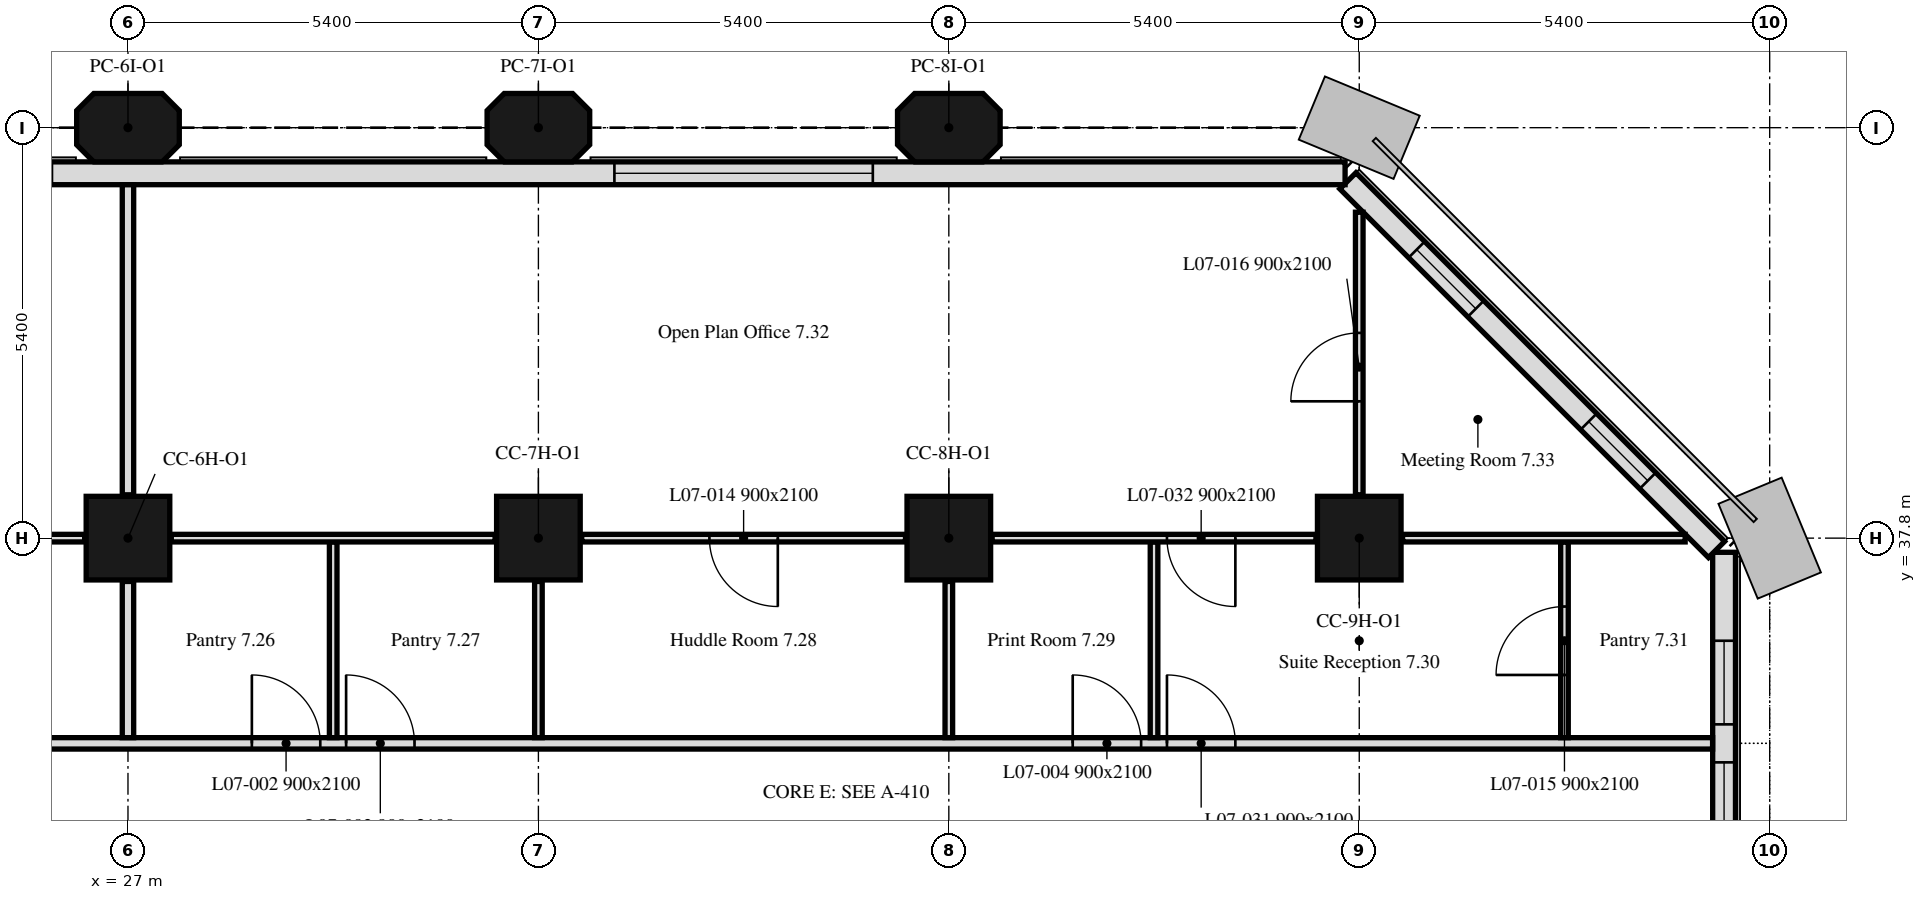
"""IFC4 building model, lengths in metres.
Left out: names, types, materials, properties, quantities, classifications, styles, units other than length and angle.
Written with IfcOpenShell. Run it as: python <this file> out.ifc"""

import sys

from ifc_helpers import new_model, si_unit, direction, frame, frame_2d, origin, origin_2d, place, context, subcontext, project, spatial, polyline, rectangle, outline, extrude, element, fill, save


model = new_model("IFC4")
c1 = context("Model", 3, precision=1e-05, world=origin(), true_north=direction((0.0, 1.0)))
c2 = subcontext(c1, "Body", "Model", "MODEL_VIEW")
j1 = project(units=[si_unit("LENGTHUNIT", "METRE"), si_unit("PLANEANGLEUNIT", "RADIAN")], contexts=[c1])
p1 = place(None, origin())
s1 = spatial("IfcSite", under=j1, at=p1, CompositionType="ELEMENT")
p2 = place(p1, origin())
s2 = spatial("IfcBuilding", under=s1, at=p2, CompositionType="ELEMENT")
p3 = place(p2, frame((0.0, 0.0, 37.4)))
s3 = spatial("IfcBuildingStorey", under=s2, at=p3, CompositionType="ELEMENT", Elevation=37.4)
for number, where, z_axis, x_axis in (
    (1, (27.0, 37.8, 0.0), (0.0, 0.0, 1.0), (1.0, 0.0, 0.0)),
    (2, (32.4, 37.8, 0.0), (0.0, 0.0, 1.0), (1.0, 0.0, 0.0)),
    (3, (37.8, 37.8, 0.0), (0.0, 0.0, 1.0), (1.0, 0.0, 0.0)),
    (4, (43.2, 37.8, 0.0), (0.0, 0.0, 1.0), (1.0, 0.0, 0.0)),
):
    element("IfcColumn", number, at=place(p3, frame(where, z_axis=z_axis, x_axis=x_axis)), inside=s3, PredefinedType="COLUMN", context=c2, shape_type="SweptSolid", body=[
        extrude(rectangle(XDim=1.1, YDim=1.1, at=origin_2d()), origin(), (0.0, 0.0, 1.0), 3.5),
    ])
for number, where, z_axis, x_axis in (
    (5, (27.0, 43.2, 0.0), (0.0, 0.0, 1.0), (1.0, 0.0, 0.0)),
    (6, (32.4, 43.2, 0.0), (0.0, 0.0, 1.0), (1.0, 0.0, 0.0)),
    (7, (37.8, 43.2, 0.0), (0.0, 0.0, 1.0), (1.0, 0.0, 0.0)),
):
    element("IfcColumn", number, at=place(p3, frame(where, z_axis=z_axis, x_axis=x_axis)), inside=s3, PredefinedType="COLUMN", context=c2, shape_type="SweptSolid", body=[
        extrude(outline(polyline([(-0.45, -0.45), (0.45, -0.45), (0.675, -0.225), (0.675, 0.225), (0.45, 0.45), (-0.45, 0.45), (-0.675, 0.225), (-0.675, -0.225), (-0.45, -0.45)])), origin(), (0.0, 0.0, 1.0), 3.5),
    ])
p4 = place(p3, frame((48.0, 5.586, 0.0), z_axis=(0.0, 0.0, 1.0), x_axis=(0.0, 1.0, 0.0)))
e8 = element("IfcWall", 8, at=p4, inside=s3, PredefinedType="SOLIDWALL", context=c2, shape_type="SweptSolid", body=[
    extrude(rectangle(XDim=32.027, YDim=0.3, at=frame_2d((16.014, 0.0))), origin(), (0.0, 0.0, 1.0), 3.5),
])
p5 = place(p4, frame((28.164, 0.0, 0.9)))
e9 = element("IfcOpeningElement", 9, at=p5, cuts=e8, PredefinedType="OPENING", context=c2, shape_type="SweptSolid", body=[
    extrude(rectangle(XDim=1.1, YDim=1.7, at=frame_2d((0.55, 0.85))), frame((0.0, 0.16, 0.0), z_axis=(0.0, -1.0, 0.0), x_axis=(1.0, 0.0, 0.0)), (0.0, 0.0, 1.0), 0.32),
])
p6 = place(p4, frame((29.764, 0.0, 0.9)))
e10 = element("IfcOpeningElement", 10, at=p6, cuts=e8, PredefinedType="OPENING", context=c2, shape_type="SweptSolid", body=[
    extrude(rectangle(XDim=1.1, YDim=1.7, at=frame_2d((0.55, 0.85))), frame((0.0, 0.16, 0.0), z_axis=(0.0, -1.0, 0.0), x_axis=(1.0, 0.0, 0.0)), (0.0, 0.0, 1.0), 0.32),
])
p7 = place(p3, frame((47.901, 37.65, 0.0), z_axis=(0.0, 0.0, 1.0), x_axis=(-0.707106781187, 0.707106781187, 0.0)))
e11 = element("IfcWall", 11, at=p7, inside=s3, PredefinedType="SOLIDWALL", context=c2, shape_type="SweptSolid", body=[
    extrude(rectangle(XDim=6.86, YDim=0.3, at=frame_2d((3.43, 0.0))), origin(), (0.0, 0.0, 1.0), 3.5),
])
p8 = place(p7, frame((1.28, 0.0, 0.9)))
e12 = element("IfcOpeningElement", 12, at=p8, cuts=e11, PredefinedType="OPENING", context=c2, shape_type="SweptSolid", body=[
    extrude(rectangle(XDim=1.1, YDim=1.7, at=frame_2d((0.55, 0.85))), frame((0.0, 0.16, 0.0), z_axis=(0.0, -1.0, 0.0), x_axis=(1.0, 0.0, 0.0)), (0.0, 0.0, 1.0), 0.32),
])
p9 = place(p7, frame((4.48, 0.0, 0.9)))
e13 = element("IfcOpeningElement", 13, at=p9, cuts=e11, PredefinedType="OPENING", context=c2, shape_type="SweptSolid", body=[
    extrude(rectangle(XDim=1.1, YDim=1.7, at=frame_2d((0.55, 0.85))), frame((0.0, 0.16, 0.0), z_axis=(0.0, -1.0, 0.0), x_axis=(1.0, 0.0, 0.0)), (0.0, 0.0, 1.0), 0.32),
])
p10 = place(p3, frame((43.014, 42.6, 0.0), z_axis=(0.0, 0.0, 1.0), x_axis=(-1.0, 0.0, 0.0)))
e14 = element("IfcWall", 14, at=p10, inside=s3, PredefinedType="SOLIDWALL", context=c2, shape_type="SweptSolid", body=[
    extrude(rectangle(XDim=32.027, YDim=0.3, at=frame_2d((16.014, 0.0))), origin(), (0.0, 0.0, 1.0), 3.5),
])
p11 = place(p10, frame((6.214, 0.0, 0.9)))
e15 = element("IfcOpeningElement", 15, at=p11, cuts=e14, PredefinedType="OPENING", context=c2, shape_type="SweptSolid", body=[
    extrude(rectangle(XDim=3.4, YDim=1.7, at=frame_2d((1.7, 0.85))), frame((0.0, 0.16, 0.0), z_axis=(0.0, -1.0, 0.0), x_axis=(1.0, 0.0, 0.0)), (0.0, 0.0, 1.0), 0.32),
])
p12 = place(p10, frame((17.014, 0.0, 0.9)))
e16 = element("IfcOpeningElement", 16, at=p12, cuts=e14, PredefinedType="OPENING", context=c2, shape_type="SweptSolid", body=[
    extrude(rectangle(XDim=3.4, YDim=1.7, at=frame_2d((1.7, 0.85))), frame((0.0, 0.16, 0.0), z_axis=(0.0, -1.0, 0.0), x_axis=(1.0, 0.0, 0.0)), (0.0, 0.0, 1.0), 0.32),
])
p13 = place(p10, frame((27.814, 0.0, 0.9)))
e17 = element("IfcOpeningElement", 17, at=p13, cuts=e14, PredefinedType="OPENING", context=c2, shape_type="SweptSolid", body=[
    extrude(rectangle(XDim=3.4, YDim=1.7, at=frame_2d((1.7, 0.85))), frame((0.0, 0.16, 0.0), z_axis=(0.0, -1.0, 0.0), x_axis=(1.0, 0.0, 0.0)), (0.0, 0.0, 1.0), 0.32),
])
p14 = place(p3, frame((6.151, 35.1, 0.0), z_axis=(0.0, 0.0, 1.0), x_axis=(1.0, 0.0, 0.0)))
e18 = element("IfcWall", 18, at=p14, inside=s3, PredefinedType="PARTITIONING", context=c2, shape_type="SweptSolid", body=[
    extrude(rectangle(XDim=41.698, YDim=0.15, at=frame_2d((20.849, 0.0))), origin(), (0.0, 0.0, 1.0), 3.5),
])
p15 = place(p14, frame((11.679, 0.0, 0.0)))
e19 = element("IfcOpeningElement", 19, at=p15, cuts=e18, PredefinedType="OPENING", context=c2, shape_type="SweptSolid", body=[
    extrude(rectangle(XDim=0.9, YDim=2.1, at=frame_2d((0.45, 1.05))), frame((0.0, 0.075, 0.0), z_axis=(0.0, -1.0, 0.0), x_axis=(1.0, 0.0, 0.0)), (0.0, 0.0, 1.0), 0.15),
])
p16 = place(p14, frame((22.479, 0.0, 0.0)))
e20 = element("IfcOpeningElement", 20, at=p16, cuts=e18, PredefinedType="OPENING", context=c2, shape_type="SweptSolid", body=[
    extrude(rectangle(XDim=0.9, YDim=2.1, at=frame_2d((0.45, 1.05))), frame((0.0, 0.075, 0.0), z_axis=(0.0, -1.0, 0.0), x_axis=(1.0, 0.0, 0.0)), (0.0, 0.0, 1.0), 0.15),
])
p17 = place(p14, frame((23.719, 0.0, 0.0)))
e21 = element("IfcOpeningElement", 21, at=p17, cuts=e18, PredefinedType="OPENING", context=c2, shape_type="SweptSolid", body=[
    extrude(rectangle(XDim=0.9, YDim=2.1, at=frame_2d((0.45, 1.05))), frame((0.0, 0.075, 0.0), z_axis=(0.0, -1.0, 0.0), x_axis=(1.0, 0.0, 0.0)), (0.0, 0.0, 1.0), 0.15),
])
p18 = place(p14, frame((33.279, 0.0, 0.0)))
e22 = element("IfcOpeningElement", 22, at=p18, cuts=e18, PredefinedType="OPENING", context=c2, shape_type="SweptSolid", body=[
    extrude(rectangle(XDim=0.9, YDim=2.1, at=frame_2d((0.45, 1.05))), frame((0.0, 0.075, 0.0), z_axis=(0.0, -1.0, 0.0), x_axis=(1.0, 0.0, 0.0)), (0.0, 0.0, 1.0), 0.15),
])
p19 = place(p14, frame((2.174, 0.0, 0.0)))
e23 = element("IfcOpeningElement", 23, at=p19, cuts=e18, PredefinedType="OPENING", context=c2, shape_type="SweptSolid", body=[
    extrude(rectangle(XDim=0.9, YDim=2.1, at=frame_2d((0.45, 1.05))), frame((0.0, 0.075, 0.0), z_axis=(0.0, -1.0, 0.0), x_axis=(1.0, 0.0, 0.0)), (0.0, 0.0, 1.0), 0.15),
])
p20 = place(p14, frame((34.519, 0.0, 0.0)))
e24 = element("IfcOpeningElement", 24, at=p20, cuts=e18, PredefinedType="OPENING", context=c2, shape_type="SweptSolid", body=[
    extrude(rectangle(XDim=0.9, YDim=2.1, at=frame_2d((0.45, 1.05))), frame((0.0, 0.075, 0.0), z_axis=(0.0, -1.0, 0.0), x_axis=(1.0, 0.0, 0.0)), (0.0, 0.0, 1.0), 0.15),
])
p21 = place(p3, frame((27.0, 35.175, 0.0), z_axis=(0.0, 0.0, 1.0), x_axis=(0.0, 1.0, 0.0)))
e25 = element("IfcWall", 25, at=p21, inside=s3, PredefinedType="PARTITIONING", context=c2, shape_type="SweptSolid", body=[
    extrude(rectangle(XDim=2.055, YDim=0.15, at=frame_2d((1.027, 0.0))), origin(), (0.0, 0.0, 1.0), 3.5),
])
p22 = place(p3, frame((26.43, 37.8, 0.0), z_axis=(0.0, 0.0, 1.0), x_axis=(-1.0, 0.0, 0.0)))
e26 = element("IfcWall", 26, at=p22, inside=s3, PredefinedType="PARTITIONING", context=c2, shape_type="SweptSolid", body=[
    extrude(rectangle(XDim=4.26, YDim=0.1, at=frame_2d((2.13, 0.0))), origin(), (0.0, 0.0, 1.0), 3.5),
])
p23 = place(p22, frame((1.68, 0.0, 0.0)))
e27 = element("IfcOpeningElement", 27, at=p23, cuts=e26, PredefinedType="OPENING", context=c2, shape_type="SweptSolid", body=[
    extrude(rectangle(XDim=0.9, YDim=2.1, at=frame_2d((0.45, 1.05))), frame((0.0, 0.05, 0.0), z_axis=(0.0, -1.0, 0.0), x_axis=(1.0, 0.0, 0.0)), (0.0, 0.0, 1.0), 0.1),
])
p24 = place(p3, frame((27.0, 38.37, 0.0), z_axis=(0.0, 0.0, 1.0), x_axis=(0.0, 1.0, 0.0)))
e28 = element("IfcWall", 28, at=p24, inside=s3, PredefinedType="PARTITIONING", context=c2, shape_type="SweptSolid", body=[
    extrude(rectangle(XDim=4.079, YDim=0.15, at=frame_2d((2.04, 0.0))), origin(), (0.0, 0.0, 1.0), 3.5),
])
p25 = place(p3, frame((29.7, 35.175, 0.0), z_axis=(0.0, 0.0, 1.0), x_axis=(0.0, 1.0, 0.0)))
e29 = element("IfcWall", 29, at=p25, inside=s3, PredefinedType="PARTITIONING", context=c2, shape_type="SweptSolid", body=[
    extrude(rectangle(XDim=2.575, YDim=0.1, at=frame_2d((1.288, 0.0))), origin(), (0.0, 0.0, 1.0), 3.5),
])
p26 = place(p3, frame((32.4, 35.175, 0.0), z_axis=(0.0, 0.0, 1.0), x_axis=(0.0, 1.0, 0.0)))
e30 = element("IfcWall", 30, at=p26, inside=s3, PredefinedType="PARTITIONING", context=c2, shape_type="SweptSolid", body=[
    extrude(rectangle(XDim=2.055, YDim=0.1, at=frame_2d((1.027, 0.0))), origin(), (0.0, 0.0, 1.0), 3.5),
])
p27 = place(p3, frame((31.83, 37.8, 0.0), z_axis=(0.0, 0.0, 1.0), x_axis=(-1.0, 0.0, 0.0)))
e31 = element("IfcWall", 31, at=p27, inside=s3, PredefinedType="PARTITIONING", context=c2, shape_type="SweptSolid", body=[
    extrude(rectangle(XDim=4.26, YDim=0.1, at=frame_2d((2.13, 0.0))), origin(), (0.0, 0.0, 1.0), 3.5),
])
p28 = place(p3, frame((37.8, 35.175, 0.0), z_axis=(0.0, 0.0, 1.0), x_axis=(0.0, 1.0, 0.0)))
e32 = element("IfcWall", 32, at=p28, inside=s3, PredefinedType="PARTITIONING", context=c2, shape_type="SweptSolid", body=[
    extrude(rectangle(XDim=2.055, YDim=0.1, at=frame_2d((1.027, 0.0))), origin(), (0.0, 0.0, 1.0), 3.5),
])
p29 = place(p3, frame((37.23, 37.8, 0.0), z_axis=(0.0, 0.0, 1.0), x_axis=(-1.0, 0.0, 0.0)))
e33 = element("IfcWall", 33, at=p29, inside=s3, PredefinedType="PARTITIONING", context=c2, shape_type="SweptSolid", body=[
    extrude(rectangle(XDim=4.26, YDim=0.1, at=frame_2d((2.13, 0.0))), origin(), (0.0, 0.0, 1.0), 3.5),
])
p30 = place(p29, frame((1.68, 0.0, 0.0)))
e34 = element("IfcOpeningElement", 34, at=p30, cuts=e33, PredefinedType="OPENING", context=c2, shape_type="SweptSolid", body=[
    extrude(rectangle(XDim=0.9, YDim=2.1, at=frame_2d((0.45, 1.05))), frame((0.0, 0.05, 0.0), z_axis=(0.0, -1.0, 0.0), x_axis=(1.0, 0.0, 0.0)), (0.0, 0.0, 1.0), 0.1),
])
p31 = place(p3, frame((40.5, 35.175, 0.0), z_axis=(0.0, 0.0, 1.0), x_axis=(0.0, 1.0, 0.0)))
e35 = element("IfcWall", 35, at=p31, inside=s3, PredefinedType="PARTITIONING", context=c2, shape_type="SweptSolid", body=[
    extrude(rectangle(XDim=2.575, YDim=0.1, at=frame_2d((1.288, 0.0))), origin(), (0.0, 0.0, 1.0), 3.5),
])
p32 = place(p3, frame((45.9, 35.175, 0.0), z_axis=(0.0, 0.0, 1.0), x_axis=(0.0, 1.0, 0.0)))
e36 = element("IfcWall", 36, at=p32, inside=s3, PredefinedType="PARTITIONING", context=c2, shape_type="SweptSolid", body=[
    extrude(rectangle(XDim=2.575, YDim=0.1, at=frame_2d((1.288, 0.0))), origin(), (0.0, 0.0, 1.0), 3.5),
])
p33 = place(p32, frame((0.825, 0.0, 0.0)))
e37 = element("IfcOpeningElement", 37, at=p33, cuts=e36, PredefinedType="OPENING", context=c2, shape_type="SweptSolid", body=[
    extrude(rectangle(XDim=0.9, YDim=2.1, at=frame_2d((0.45, 1.05))), frame((0.0, 0.05, 0.0), z_axis=(0.0, -1.0, 0.0), x_axis=(1.0, 0.0, 0.0)), (0.0, 0.0, 1.0), 0.1),
])
p34 = place(p3, frame((42.63, 37.8, 0.0), z_axis=(0.0, 0.0, 1.0), x_axis=(-1.0, 0.0, 0.0)))
e38 = element("IfcWall", 38, at=p34, inside=s3, PredefinedType="PARTITIONING", context=c2, shape_type="SweptSolid", body=[
    extrude(rectangle(XDim=4.26, YDim=0.1, at=frame_2d((2.13, 0.0))), origin(), (0.0, 0.0, 1.0), 3.5),
])
p35 = place(p34, frame((1.06, 0.0, 0.0)))
e39 = element("IfcOpeningElement", 39, at=p35, cuts=e38, PredefinedType="OPENING", context=c2, shape_type="SweptSolid", body=[
    extrude(rectangle(XDim=0.9, YDim=2.1, at=frame_2d((0.45, 1.05))), frame((0.0, 0.05, 0.0), z_axis=(0.0, -1.0, 0.0), x_axis=(1.0, 0.0, 0.0)), (0.0, 0.0, 1.0), 0.1),
])
p36 = place(p3, frame((47.488, 37.8, 0.0), z_axis=(0.0, 0.0, 1.0), x_axis=(-1.0, 0.0, 0.0)))
e40 = element("IfcWall", 40, at=p36, inside=s3, PredefinedType="PARTITIONING", context=c2, shape_type="SweptSolid", body=[
    extrude(rectangle(XDim=3.718, YDim=0.1, at=frame_2d((1.859, 0.0))), origin(), (0.0, 0.0, 1.0), 3.5),
])
p37 = place(p3, frame((43.2, 38.37, 0.0), z_axis=(0.0, 0.0, 1.0), x_axis=(0.0, 1.0, 0.0)))
e41 = element("IfcWall", 41, at=p37, inside=s3, PredefinedType="PARTITIONING", context=c2, shape_type="SweptSolid", body=[
    extrude(rectangle(XDim=3.718, YDim=0.1, at=frame_2d((1.859, 0.0))), origin(), (0.0, 0.0, 1.0), 3.5),
])
p38 = place(p37, frame((1.23, 0.0, 0.0)))
e42 = element("IfcOpeningElement", 42, at=p38, cuts=e41, PredefinedType="OPENING", context=c2, shape_type="SweptSolid", body=[
    extrude(rectangle(XDim=0.9, YDim=2.1, at=frame_2d((0.45, 1.05))), frame((0.0, 0.05, 0.0), z_axis=(0.0, -1.0, 0.0), x_axis=(1.0, 0.0, 0.0)), (0.0, 0.0, 1.0), 0.1),
])
p39 = place(p5, origin())
e43 = element("IfcWindow", 43, at=p39, inside=s3, PartitioningType="SINGLE_PANEL", PredefinedType="WINDOW", context=c2, shape_type="SweptSolid", body=[
    extrude(rectangle(XDim=1.1, YDim=1.7, at=frame_2d((0.55, 0.85))), frame((0.0, 0.03, 0.0), z_axis=(0.0, -1.0, 0.0), x_axis=(1.0, 0.0, 0.0)), (0.0, 0.0, 1.0), 0.06),
])
fill(e9, e43)
p40 = place(p6, origin())
e44 = element("IfcWindow", 44, at=p40, inside=s3, PartitioningType="SINGLE_PANEL", PredefinedType="WINDOW", context=c2, shape_type="SweptSolid", body=[
    extrude(rectangle(XDim=1.1, YDim=1.7, at=frame_2d((0.55, 0.85))), frame((0.0, 0.03, 0.0), z_axis=(0.0, -1.0, 0.0), x_axis=(1.0, 0.0, 0.0)), (0.0, 0.0, 1.0), 0.06),
])
fill(e10, e44)
p41 = place(p8, origin())
e45 = element("IfcWindow", 45, at=p41, inside=s3, PartitioningType="SINGLE_PANEL", PredefinedType="WINDOW", context=c2, shape_type="SweptSolid", body=[
    extrude(rectangle(XDim=1.1, YDim=1.7, at=frame_2d((0.55, 0.85))), frame((0.0, 0.03, 0.0), z_axis=(0.0, -1.0, 0.0), x_axis=(1.0, 0.0, 0.0)), (0.0, 0.0, 1.0), 0.06),
])
fill(e12, e45)
p42 = place(p9, origin())
e46 = element("IfcWindow", 46, at=p42, inside=s3, PartitioningType="SINGLE_PANEL", PredefinedType="WINDOW", context=c2, shape_type="SweptSolid", body=[
    extrude(rectangle(XDim=1.1, YDim=1.7, at=frame_2d((0.55, 0.85))), frame((0.0, 0.03, 0.0), z_axis=(0.0, -1.0, 0.0), x_axis=(1.0, 0.0, 0.0)), (0.0, 0.0, 1.0), 0.06),
])
fill(e13, e46)
p43 = place(p11, origin())
e47 = element("IfcWindow", 47, at=p43, inside=s3, PartitioningType="SINGLE_PANEL", PredefinedType="WINDOW", context=c2, shape_type="SweptSolid", body=[
    extrude(rectangle(XDim=3.4, YDim=1.7, at=frame_2d((1.7, 0.85))), frame((0.0, 0.03, 0.0), z_axis=(0.0, -1.0, 0.0), x_axis=(1.0, 0.0, 0.0)), (0.0, 0.0, 1.0), 0.06),
])
fill(e15, e47)
p44 = place(p16, origin())
e48 = element("IfcDoor", 48, at=p44, inside=s3, OperationType="SINGLE_SWING_LEFT", PredefinedType="DOOR", context=c2, shape_type="SweptSolid", body=[
    extrude(rectangle(XDim=0.9, YDim=2.1, at=frame_2d((0.45, 1.05))), frame((0.0, 0.025, 0.0), z_axis=(0.0, -1.0, 0.0), x_axis=(1.0, 0.0, 0.0)), (0.0, 0.0, 1.0), 0.05),
])
fill(e20, e48)
p45 = place(p17, origin())
e49 = element("IfcDoor", 49, at=p45, inside=s3, OperationType="SINGLE_SWING_LEFT", PredefinedType="DOOR", context=c2, shape_type="SweptSolid", body=[
    extrude(rectangle(XDim=0.9, YDim=2.1, at=frame_2d((0.45, 1.05))), frame((0.0, 0.025, 0.0), z_axis=(0.0, -1.0, 0.0), x_axis=(1.0, 0.0, 0.0)), (0.0, 0.0, 1.0), 0.05),
])
fill(e21, e49)
p46 = place(p18, origin())
e50 = element("IfcDoor", 50, at=p46, inside=s3, OperationType="SINGLE_SWING_LEFT", PredefinedType="DOOR", context=c2, shape_type="SweptSolid", body=[
    extrude(rectangle(XDim=0.9, YDim=2.1, at=frame_2d((0.45, 1.05))), frame((0.0, 0.025, 0.0), z_axis=(0.0, -1.0, 0.0), x_axis=(1.0, 0.0, 0.0)), (0.0, 0.0, 1.0), 0.05),
])
fill(e22, e50)
p47 = place(p30, origin())
e51 = element("IfcDoor", 51, at=p47, inside=s3, OperationType="SINGLE_SWING_RIGHT", PredefinedType="DOOR", context=c2, shape_type="SweptSolid", body=[
    extrude(rectangle(XDim=0.9, YDim=2.1, at=frame_2d((0.45, 1.05))), frame((0.0, 0.025, 0.0), z_axis=(0.0, -1.0, 0.0), x_axis=(1.0, 0.0, 0.0)), (0.0, 0.0, 1.0), 0.05),
])
fill(e34, e51)
p48 = place(p33, origin())
e52 = element("IfcDoor", 52, at=p48, inside=s3, OperationType="SINGLE_SWING_RIGHT", PredefinedType="DOOR", context=c2, shape_type="SweptSolid", body=[
    extrude(rectangle(XDim=0.9, YDim=2.1, at=frame_2d((0.45, 1.05))), frame((0.0, 0.025, 0.0), z_axis=(0.0, -1.0, 0.0), x_axis=(1.0, 0.0, 0.0)), (0.0, 0.0, 1.0), 0.05),
])
fill(e37, e52)
p49 = place(p38, origin())
e53 = element("IfcDoor", 53, at=p49, inside=s3, OperationType="SINGLE_SWING_LEFT", PredefinedType="DOOR", context=c2, shape_type="SweptSolid", body=[
    extrude(rectangle(XDim=0.9, YDim=2.1, at=frame_2d((0.45, 1.05))), frame((0.0, 0.025, 0.0), z_axis=(0.0, -1.0, 0.0), x_axis=(1.0, 0.0, 0.0)), (0.0, 0.0, 1.0), 0.05),
])
fill(e42, e53)
p50 = place(p20, origin())
e54 = element("IfcDoor", 54, at=p50, inside=s3, OperationType="SINGLE_SWING_RIGHT", PredefinedType="DOOR", context=c2, shape_type="SweptSolid", body=[
    extrude(rectangle(XDim=0.9, YDim=2.1, at=frame_2d((0.45, 1.05))), frame((0.0, 0.025, 0.0), z_axis=(0.0, -1.0, 0.0), x_axis=(1.0, 0.0, 0.0)), (0.0, 0.0, 1.0), 0.05),
])
fill(e24, e54)
p51 = place(p35, origin())
e55 = element("IfcDoor", 55, at=p51, inside=s3, OperationType="SINGLE_SWING_RIGHT", PredefinedType="DOOR", context=c2, shape_type="SweptSolid", body=[
    extrude(rectangle(XDim=0.9, YDim=2.1, at=frame_2d((0.45, 1.05))), frame((0.0, 0.025, 0.0), z_axis=(0.0, -1.0, 0.0), x_axis=(1.0, 0.0, 0.0)), (0.0, 0.0, 1.0), 0.05),
])
fill(e39, e55)
save(model, sys.argv[1])
